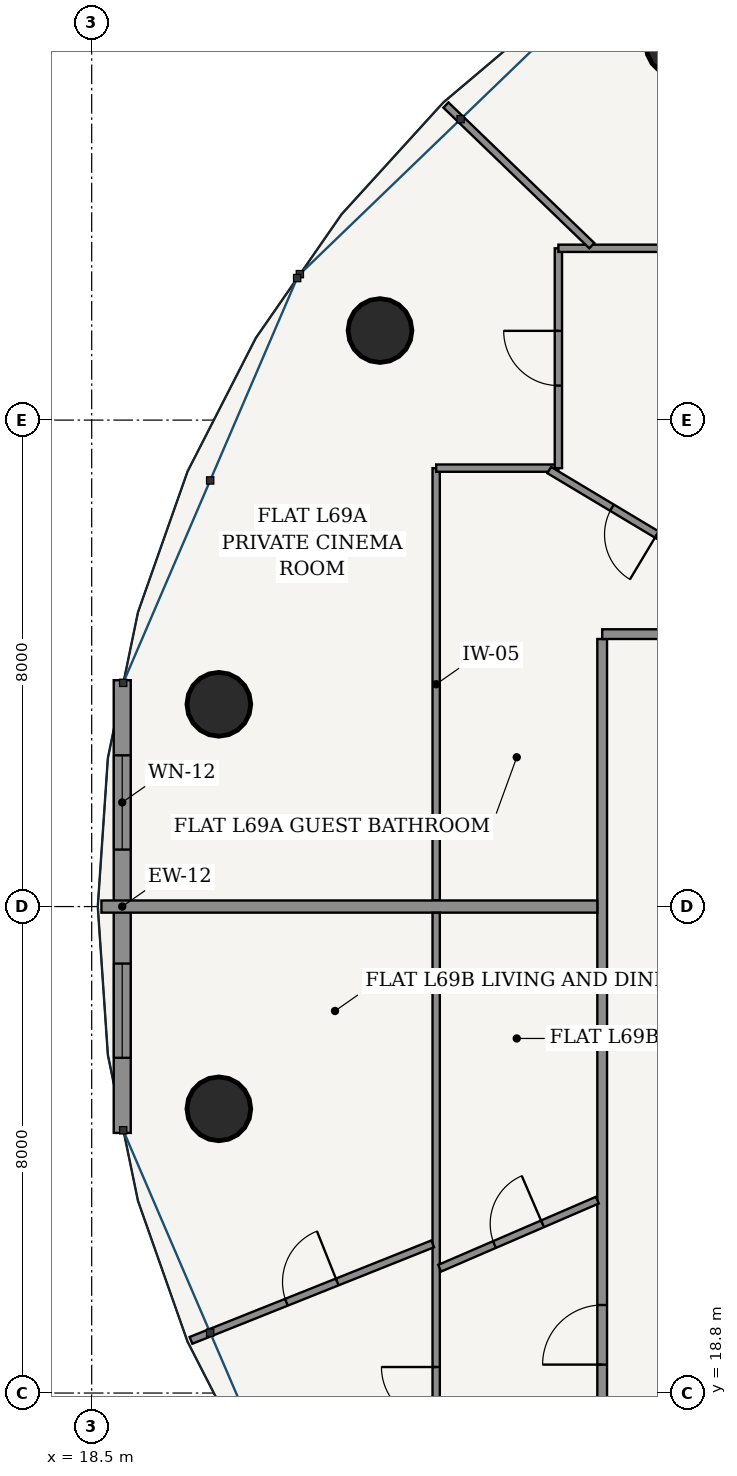
"""IFC4 building model, lengths in metres.
Left out: names, types, materials, properties, quantities, classifications, styles, units other than length and angle.
Written with IfcOpenShell. Run it as: python <this file> out.ifc"""

import sys

from ifc_helpers import new_model, si_unit, direction, frame, frame_2d, origin, origin_2d, place, context, subcontext, project, spatial, rectangle, hollow_circle, extrude, source, transform, mapped, element, fill, save


model = new_model("IFC4")
c1 = context("Model", 3, precision=1e-05, world=origin(), true_north=direction((-0.2419218956, 0.970295726276)))
c2 = subcontext(c1, "Body", "Model", "MODEL_VIEW")
j1 = project(units=[si_unit("LENGTHUNIT", "METRE"), si_unit("PLANEANGLEUNIT", "RADIAN")], contexts=[c1])
p1 = place(None, origin())
s1 = spatial("IfcSite", under=j1, at=p1, CompositionType="ELEMENT")
p2 = place(p1, origin())
s2 = spatial("IfcBuilding", under=s1, at=p2, CompositionType="ELEMENT")
p3 = place(p2, frame((0.0, 0.0, 263.2)))
s3 = spatial("IfcBuildingStorey", under=s2, at=p3, CompositionType="ELEMENT", Elevation=263.2)
for number, where, z_axis, x_axis in (
    (1, (28.139, 40.977, 0.0), (0.0, 0.0, 1.0), (1.0, 0.0, 0.0)),
    (2, (23.241, 36.272, 0.0), (0.0, 0.0, 1.0), (1.0, 0.0, 0.0)),
    (3, (20.591, 30.126, 0.0), (0.0, 0.0, 1.0), (1.0, 0.0, 0.0)),
    (4, (20.591, 23.474, 0.0), (0.0, 0.0, 1.0), (1.0, 0.0, 0.0)),
):
    element("IfcColumn", number, at=place(p3, frame(where, z_axis=z_axis, x_axis=x_axis)), inside=s3, PredefinedType="COLUMN", context=c2, shape_type="SweptSolid", body=[
        extrude(hollow_circle(Radius=0.525, WallThickness=0.035, at=origin_2d()), origin(), (0.0, 0.0, 1.0), 3.75),
    ])
p4 = place(p3, frame((19.002, 30.522, 0.0), z_axis=(0.0, 0.0, 1.0), x_axis=(0.0, -1.0, 0.0)))
e5 = element("IfcWall", 5, at=p4, inside=s3, PredefinedType="SOLIDWALL", context=c2, shape_type="SweptSolid", body=[
    extrude(rectangle(XDim=7.445, YDim=0.28, at=frame_2d((3.722, 0.0))), origin(), (0.0, 0.0, 1.0), 3.49),
])
p5 = place(p4, frame((1.235, 0.0, 0.85)))
e6 = element("IfcOpeningElement", 6, at=p5, cuts=e5, PredefinedType="OPENING", context=c2, shape_type="SweptSolid", body=[
    extrude(rectangle(XDim=1.55, YDim=1.95, at=frame_2d((0.775, 0.975))), frame((0.0, 0.15, 0.0), z_axis=(0.0, -1.0, 0.0), x_axis=(1.0, 0.0, 0.0)), (0.0, 0.0, 1.0), 0.3),
])
p6 = place(p4, frame((4.66, 0.0, 0.85)))
e7 = element("IfcOpeningElement", 7, at=p6, cuts=e5, PredefinedType="OPENING", context=c2, shape_type="SweptSolid", body=[
    extrude(rectangle(XDim=1.55, YDim=1.95, at=frame_2d((0.775, 0.975))), frame((0.0, 0.15, 0.0), z_axis=(0.0, -1.0, 0.0), x_axis=(1.0, 0.0, 0.0)), (0.0, 0.0, 1.0), 0.3),
])
p7 = place(p3, frame((26.895, 17.275, 0.0), z_axis=(0.0, 0.0, 1.0), x_axis=(0.0, 1.0, 0.0)))
e8 = element("IfcWall", 8, at=p7, inside=s3, PredefinedType="PARTITIONING", context=c2, shape_type="SweptSolid", body=[
    extrude(rectangle(XDim=13.925, YDim=0.16, at=frame_2d((6.962, 0.0))), origin(), (0.0, 0.0, 1.0), 3.015),
])
p8 = place(p7, frame((1.992, 0.0, 0.0)))
e9 = element("IfcOpeningElement", 9, at=p8, cuts=e8, PredefinedType="OPENING", context=c2, shape_type="SweptSolid", body=[
    extrude(rectangle(XDim=0.98, YDim=2.2, at=frame_2d((0.49, 1.1))), frame((0.0, 0.09, 0.0), z_axis=(0.0, -1.0, 0.0), x_axis=(1.0, 0.0, 0.0)), (0.0, 0.0, 1.0), 0.18),
])
p9 = place(p3, frame((26.895, 31.28, 0.0), z_axis=(0.0, 0.0, 1.0), x_axis=(1.0, 0.0, 0.0)))
e10 = element("IfcWall", 10, at=p9, inside=s3, PredefinedType="PARTITIONING", context=c2, shape_type="SweptSolid", body=[
    extrude(rectangle(XDim=1.93, YDim=0.16, at=frame_2d((0.965, 0.0))), origin(), (0.0, 0.0, 1.0), 3.49),
])
p10 = place(p3, frame((24.165, 26.902, 0.0), z_axis=(0.0, 0.0, 1.0), x_axis=(0.0, 1.0, 0.0)))
e11 = element("IfcWall", 11, at=p10, inside=s3, PredefinedType="PARTITIONING", context=c2, shape_type="SweptSolid", body=[
    extrude(rectangle(XDim=7.108, YDim=0.12, at=frame_2d((3.554, 0.0))), origin(), (0.0, 0.0, 1.0), 3.015),
])
p11 = place(p3, frame((24.165, 34.01, 0.0), z_axis=(0.0, 0.0, 1.0), x_axis=(1.0, 0.0, 0.0)))
e12 = element("IfcWall", 12, at=p11, inside=s3, PredefinedType="PARTITIONING", context=c2, shape_type="SweptSolid", body=[
    extrude(rectangle(XDim=2.01, YDim=0.12, at=frame_2d((1.005, 0.0))), origin(), (0.0, 0.0, 1.0), 3.209),
])
p12 = place(p3, frame((26.175, 34.01, 0.0), z_axis=(0.0, 0.0, 1.0), x_axis=(0.0, 1.0, 0.0)))
e13 = element("IfcWall", 13, at=p12, inside=s3, PredefinedType="PARTITIONING", context=c2, shape_type="SweptSolid", body=[
    extrude(rectangle(XDim=3.615, YDim=0.12, at=frame_2d((1.808, 0.0))), origin(), (0.0, 0.0, 1.0), 3.015),
])
p13 = place(p12, frame((1.357, 0.0, 0.0)))
e14 = element("IfcOpeningElement", 14, at=p13, cuts=e13, PredefinedType="OPENING", context=c2, shape_type="SweptSolid", body=[
    extrude(rectangle(XDim=0.9, YDim=2.15, at=frame_2d((0.45, 1.075))), frame((0.0, 0.07, 0.0), z_axis=(0.0, -1.0, 0.0), x_axis=(1.0, 0.0, 0.0)), (0.0, 0.0, 1.0), 0.14),
])
p14 = place(p3, frame((26.175, 37.625, 0.0), z_axis=(0.0, 0.0, 1.0), x_axis=(1.0, 0.0, 0.0)))
e15 = element("IfcWall", 15, at=p14, inside=s3, PredefinedType="PARTITIONING", context=c2, shape_type="SweptSolid", body=[
    extrude(rectangle(XDim=23.65, YDim=0.12, at=frame_2d((11.825, 0.0))), origin(), (0.0, 0.0, 1.0), 3.015),
])
p15 = place(p14, frame((14.733, 0.0, 0.0)))
e16 = element("IfcOpeningElement", 16, at=p15, cuts=e15, PredefinedType="OPENING", context=c2, shape_type="SweptSolid", body=[
    extrude(rectangle(XDim=0.9, YDim=2.15, at=frame_2d((0.45, 1.075))), frame((0.0, 0.07, 0.0), z_axis=(0.0, -1.0, 0.0), x_axis=(1.0, 0.0, 0.0)), (0.0, 0.0, 1.0), 0.14),
])
p16 = place(p14, frame((11.279, 0.0, 0.0)))
e17 = element("IfcOpeningElement", 17, at=p16, cuts=e15, PredefinedType="OPENING", context=c2, shape_type="SweptSolid", body=[
    extrude(rectangle(XDim=0.9, YDim=2.15, at=frame_2d((0.45, 1.075))), frame((0.0, 0.07, 0.0), z_axis=(0.0, -1.0, 0.0), x_axis=(1.0, 0.0, 0.0)), (0.0, 0.0, 1.0), 0.14),
])
p17 = place(p14, frame((2.678, 0.0, 0.0)))
e18 = element("IfcOpeningElement", 18, at=p17, cuts=e15, PredefinedType="OPENING", context=c2, shape_type="SweptSolid", body=[
    extrude(rectangle(XDim=0.9, YDim=2.15, at=frame_2d((0.45, 1.075))), frame((0.0, 0.07, 0.0), z_axis=(0.0, -1.0, 0.0), x_axis=(1.0, 0.0, 0.0)), (0.0, 0.0, 1.0), 0.14),
])
p18 = place(p3, frame((26.725, 37.668, 0.0), z_axis=(0.0, 0.0, 1.0), x_axis=(-0.719954096891, 0.694021684366, 0.0)))
e19 = element("IfcWall", 19, at=p18, inside=s3, PredefinedType="PARTITIONING", context=c2, shape_type="SweptSolid", body=[
    extrude(rectangle(XDim=3.333, YDim=0.12, at=frame_2d((1.667, 0.0))), origin(), (0.0, 0.0, 1.0), 3.121),
])
p19 = place(p3, frame((28.825, 32.3, 0.0), z_axis=(0.0, 0.0, 1.0), x_axis=(-0.857743539935, 0.514077834282, 0.0)))
e20 = element("IfcWall", 20, at=p19, inside=s3, PredefinedType="PARTITIONING", context=c2, shape_type="SweptSolid", body=[
    extrude(rectangle(XDim=3.265, YDim=0.12, at=frame_2d((1.632, 0.0))), origin(), (0.0, 0.0, 1.0), 3.49),
])
p20 = place(p19, frame((1.202, 0.0, 0.0)))
e21 = element("IfcOpeningElement", 21, at=p20, cuts=e20, PredefinedType="OPENING", context=c2, shape_type="SweptSolid", body=[
    extrude(rectangle(XDim=0.86, YDim=2.15, at=frame_2d((0.43, 1.075))), frame((0.0, 0.07, 0.0), z_axis=(0.0, -1.0, 0.0), x_axis=(1.0, 0.0, 0.0)), (0.0, 0.0, 1.0), 0.14),
])
p21 = place(p3, frame((26.815, 26.8, 0.0), z_axis=(0.0, 0.0, 1.0), x_axis=(-1.0, 0.0, 0.0)))
e22 = element("IfcWall", 22, at=p21, inside=s3, PredefinedType="PARTITIONING", context=c2, shape_type="SweptSolid", body=[
    extrude(rectangle(XDim=8.155, YDim=0.2, at=frame_2d((4.078, 0.0))), origin(), (0.0, 0.0, 1.0), 3.121),
])
p22 = place(p3, frame((24.165, 14.465, 0.0), z_axis=(0.0, 0.0, 1.0), x_axis=(0.0, 1.0, 0.0)))
e23 = element("IfcWall", 23, at=p22, inside=s3, PredefinedType="PARTITIONING", context=c2, shape_type="SweptSolid", body=[
    extrude(rectangle(XDim=12.233, YDim=0.12, at=frame_2d((6.116, 0.0))), origin(), (0.0, 0.0, 1.0), 3.015),
])
p23 = place(p22, frame((3.863, 0.0, 0.0)))
e24 = element("IfcOpeningElement", 24, at=p23, cuts=e23, PredefinedType="OPENING", context=c2, shape_type="SweptSolid", body=[
    extrude(rectangle(XDim=0.9, YDim=2.15, at=frame_2d((0.45, 1.075))), frame((0.0, 0.07, 0.0), z_axis=(0.0, -1.0, 0.0), x_axis=(1.0, 0.0, 0.0)), (0.0, 0.0, 1.0), 0.14),
])
p24 = place(p3, frame((24.107, 21.253, 0.0), z_axis=(0.0, 0.0, 1.0), x_axis=(-0.928712556691, -0.370800467966, 0.0)))
e25 = element("IfcWall", 25, at=p24, inside=s3, PredefinedType="PARTITIONING", context=c2, shape_type="SweptSolid", body=[
    extrude(rectangle(XDim=4.28, YDim=0.12, at=frame_2d((2.14, 0.0))), origin(), (0.0, 0.0, 1.0), 3.121),
])
p25 = place(p24, frame((1.69, 0.0, 0.0)))
e26 = element("IfcOpeningElement", 26, at=p25, cuts=e25, PredefinedType="OPENING", context=c2, shape_type="SweptSolid", body=[
    extrude(rectangle(XDim=0.9, YDim=2.15, at=frame_2d((0.45, 1.075))), frame((0.0, 0.07, 0.0), z_axis=(0.0, -1.0, 0.0), x_axis=(1.0, 0.0, 0.0)), (0.0, 0.0, 1.0), 0.14),
])
p26 = place(p3, frame((26.815, 21.972, 0.0), z_axis=(0.0, 0.0, 1.0), x_axis=(-0.918135987469, -0.396265452082, 0.0)))
e27 = element("IfcWall", 27, at=p26, inside=s3, PredefinedType="PARTITIONING", context=c2, shape_type="SweptSolid", body=[
    extrude(rectangle(XDim=2.824, YDim=0.12, at=frame_2d((1.412, 0.0))), origin(), (0.0, 0.0, 1.0), 3.209),
])
p27 = place(p26, frame((0.982, 0.0, 0.0)))
e28 = element("IfcOpeningElement", 28, at=p27, cuts=e27, PredefinedType="OPENING", context=c2, shape_type="SweptSolid", body=[
    extrude(rectangle(XDim=0.86, YDim=2.15, at=frame_2d((0.43, 1.075))), frame((0.0, 0.07, 0.0), z_axis=(0.0, -1.0, 0.0), x_axis=(1.0, 0.0, 0.0)), (0.0, 0.0, 1.0), 0.14),
])
m1 = source(origin(), c2, "Body", "SweptSolid", [
    extrude(rectangle(XDim=1.55, YDim=1.95, at=frame_2d((0.775, 0.975))), frame((0.0, 0.03, 0.0), z_axis=(0.0, -1.0, 0.0), x_axis=(1.0, 0.0, 0.0)), (0.0, 0.0, 1.0), 0.06),
])
p28 = place(p5, origin())
e29 = element("IfcWindow", 29, at=p28, inside=s3, PartitioningType="SINGLE_PANEL", PredefinedType="WINDOW", context=c2, shape_type="MappedRepresentation", body=[
    mapped(m1, transform((0.0, 0.0, 0.0), scale=1.0)),
])
fill(e6, e29)
p29 = place(p6, origin())
e30 = element("IfcWindow", 30, at=p29, inside=s3, PartitioningType="SINGLE_PANEL", PredefinedType="WINDOW", context=c2, shape_type="MappedRepresentation", body=[
    mapped(m1, transform((0.0, 0.0, 0.0), scale=1.0)),
])
fill(e7, e30)
m2 = source(origin(), c2, "Body", "SweptSolid", [
    extrude(rectangle(XDim=0.86, YDim=2.15, at=frame_2d((0.43, 1.075))), frame((0.0, 0.025, 0.0), z_axis=(0.0, -1.0, 0.0), x_axis=(1.0, 0.0, 0.0)), (0.0, 0.0, 1.0), 0.05),
])
p30 = place(p20, origin())
e31 = element("IfcDoor", 31, at=p30, inside=s3, OperationType="SINGLE_SWING_LEFT", PredefinedType="DOOR", context=c2, shape_type="MappedRepresentation", body=[
    mapped(m2, transform((0.0, 0.0, 0.0), scale=1.0)),
])
fill(e21, e31)
m3 = source(origin(), c2, "Body", "SweptSolid", [
    extrude(rectangle(XDim=0.9, YDim=2.15, at=frame_2d((0.45, 1.075))), frame((0.0, 0.025, 0.0), z_axis=(0.0, -1.0, 0.0), x_axis=(1.0, 0.0, 0.0)), (0.0, 0.0, 1.0), 0.05),
])
p31 = place(p13, origin())
e32 = element("IfcDoor", 32, at=p31, inside=s3, OperationType="SINGLE_SWING_RIGHT", PredefinedType="DOOR", context=c2, shape_type="MappedRepresentation", body=[
    mapped(m3, transform((0.0, 0.0, 0.0), scale=1.0)),
])
fill(e14, e32)
m4 = source(origin(), c2, "Body", "SweptSolid", [
    extrude(rectangle(XDim=0.98, YDim=2.2, at=frame_2d((0.49, 1.1))), frame((0.0, 0.025, 0.0), z_axis=(0.0, -1.0, 0.0), x_axis=(1.0, 0.0, 0.0)), (0.0, 0.0, 1.0), 0.05),
])
p32 = place(p8, origin())
e33 = element("IfcDoor", 33, at=p32, inside=s3, OperationType="SINGLE_SWING_LEFT", PredefinedType="DOOR", context=c2, shape_type="MappedRepresentation", body=[
    mapped(m4, transform((0.0, 0.0, 0.0), scale=1.0)),
])
fill(e9, e33)
p33 = place(p27, frame((0.86, 0.0, 0.0), z_axis=(0.0, 0.0, 1.0), x_axis=(-1.0, 0.0, 0.0)))
e34 = element("IfcDoor", 34, at=p33, inside=s3, OperationType="SINGLE_SWING_RIGHT", PredefinedType="DOOR", context=c2, shape_type="MappedRepresentation", body=[
    mapped(m2, transform((0.0, 0.0, 0.0), scale=1.0)),
])
fill(e28, e34)
p34 = place(p23, origin())
e35 = element("IfcDoor", 35, at=p34, inside=s3, OperationType="SINGLE_SWING_RIGHT", PredefinedType="DOOR", context=c2, shape_type="MappedRepresentation", body=[
    mapped(m3, transform((0.0, 0.0, 0.0), scale=1.0)),
])
fill(e24, e35)
p35 = place(p25, frame((0.9, 0.0, 0.0), z_axis=(0.0, 0.0, 1.0), x_axis=(-1.0, 0.0, 0.0)))
e36 = element("IfcDoor", 36, at=p35, inside=s3, OperationType="SINGLE_SWING_RIGHT", PredefinedType="DOOR", context=c2, shape_type="MappedRepresentation", body=[
    mapped(m3, transform((0.0, 0.0, 0.0), scale=1.0)),
])
fill(e26, e36)
save(model, sys.argv[1])
